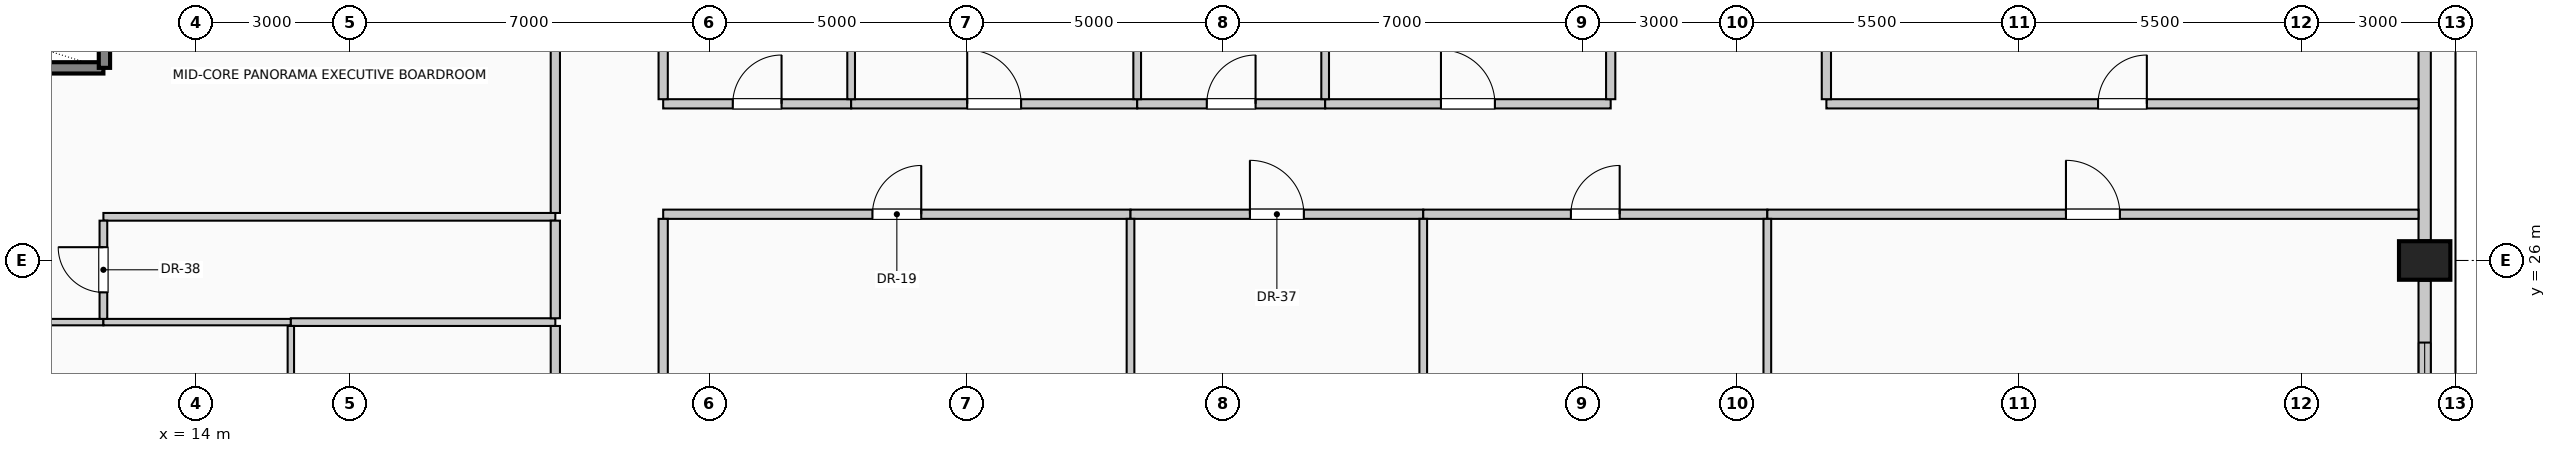
"""IFC4 building model, lengths in metres.
Left out: names, types, materials, properties, quantities, classifications, styles, units other than length and angle.
Written with IfcOpenShell. Run it as: python <this file> out.ifc"""

import sys

from ifc_helpers import new_model, si_unit, direction, frame, frame_2d, origin, origin_2d, place, context, subcontext, project, spatial, rectangle, extrude, element, fill, save


model = new_model("IFC4")
c1 = context("Model", 3, precision=1e-05, world=origin(), true_north=direction((0.0, 1.0)))
c2 = subcontext(c1, "Body", "Model", "MODEL_VIEW")
j1 = project(units=[si_unit("LENGTHUNIT", "METRE"), si_unit("PLANEANGLEUNIT", "RADIAN")], contexts=[c1])
p1 = place(None, origin())
s1 = spatial("IfcSite", under=j1, at=p1, CompositionType="ELEMENT")
p2 = place(p1, origin())
s2 = spatial("IfcBuilding", under=s1, at=p2, CompositionType="ELEMENT")
p3 = place(p2, frame((0.0, 0.0, 230.6)))
s3 = spatial("IfcBuildingStorey", under=s2, at=p3, CompositionType="ELEMENT", Elevation=230.6)
p4 = place(p3, frame((57.4, 26.0, 0.0), z_axis=(0.0, 0.0, 1.0), x_axis=(0.0, 1.0, 0.0)))
e1 = element("IfcColumn", 1, at=p4, inside=s3, PredefinedType="COLUMN", context=c2, shape_type="SweptSolid", body=[
    extrude(rectangle(XDim=0.75, YDim=1.0, at=origin_2d()), origin(), (0.0, 0.0, 1.0), 4.0),
])
p5 = place(p3, frame((57.4, 25.605, 0.0), z_axis=(0.0, 0.0, 1.0), x_axis=(0.0, -1.0, 0.0)))
e2 = element("IfcWall", 2, at=p5, inside=s3, PredefinedType="SOLIDWALL", context=c2, shape_type="SweptSolid", body=[
    extrude(rectangle(XDim=7.21, YDim=0.24, at=frame_2d((3.605, 0.0))), origin(), (0.0, 0.0, 1.0), 3.0),
])
p6 = place(p5, frame((1.203, 0.0, 0.42)))
e3 = element("IfcOpeningElement", 3, at=p6, cuts=e2, PredefinedType="OPENING", context=c2, shape_type="SweptSolid", body=[
    extrude(rectangle(XDim=1.8, YDim=2.2, at=frame_2d((0.9, 1.1))), frame((0.0, 0.13, 0.0), z_axis=(0.0, -1.0, 0.0), x_axis=(1.0, 0.0, 0.0)), (0.0, 0.0, 1.0), 0.26),
])
p7 = place(p5, frame((4.207, 0.0, 0.42)))
e4 = element("IfcOpeningElement", 4, at=p7, cuts=e2, PredefinedType="OPENING", context=c2, shape_type="SweptSolid", body=[
    extrude(rectangle(XDim=1.8, YDim=2.2, at=frame_2d((0.9, 1.1))), frame((0.0, 0.13, 0.0), z_axis=(0.0, -1.0, 0.0), x_axis=(1.0, 0.0, 0.0)), (0.0, 0.0, 1.0), 0.26),
])
p8 = place(p3, frame((57.4, 33.605, 0.0), z_axis=(0.0, 0.0, 1.0), x_axis=(0.0, -1.0, 0.0)))
e5 = element("IfcWall", 5, at=p8, inside=s3, PredefinedType="SOLIDWALL", context=c2, shape_type="SweptSolid", body=[
    extrude(rectangle(XDim=7.21, YDim=0.24, at=frame_2d((3.605, 0.0))), origin(), (0.0, 0.0, 1.0), 3.0),
])
p9 = place(p3, frame((3.55, 29.75, 0.0), z_axis=(0.0, 0.0, 1.0), x_axis=(1.0, 0.0, 0.0)))
e6 = element("IfcWall", 6, at=p9, inside=s3, PredefinedType="SOLIDWALL", context=c2, shape_type="SweptSolid", body=[
    extrude(rectangle(XDim=8.65, YDim=0.22, at=frame_2d((4.325, 0.0))), origin(), (0.0, 0.0, 1.0), 4.0),
])
p10 = place(p3, frame((12.22, 29.75, 0.0), z_axis=(0.0, 0.0, 1.0), x_axis=(0.0, 1.0, 0.0)))
e7 = element("IfcWall", 7, at=p10, inside=s3, PredefinedType="SOLIDWALL", context=c2, shape_type="SweptSolid", body=[
    extrude(rectangle(XDim=2.6, YDim=0.22, at=frame_2d((1.3, 0.0))), origin(), (0.0, 0.0, 1.0), 4.0),
])
p11 = place(p3, frame((9.8, 24.8, 0.0), z_axis=(0.0, 0.0, 1.0), x_axis=(1.0, 0.0, 0.0)))
e8 = element("IfcWall", 8, at=p11, inside=s3, PredefinedType="PARTITIONING", context=c2, shape_type="SweptSolid", body=[
    extrude(rectangle(XDim=2.4, YDim=0.125, at=frame_2d((1.2, 0.0))), origin(), (0.0, 0.0, 1.0), 3.75),
])
p12 = place(p3, frame((12.2, 24.8, 0.0), z_axis=(0.0, 0.0, 1.0), x_axis=(1.0, 0.0, 0.0)))
e9 = element("IfcWall", 9, at=p12, inside=s3, PredefinedType="PARTITIONING", context=c2, shape_type="SweptSolid", body=[
    extrude(rectangle(XDim=3.65, YDim=0.125, at=frame_2d((1.825, 0.0))), origin(), (0.0, 0.0, 1.0), 3.75),
])
p13 = place(p3, frame((15.85, 24.8, 0.0), z_axis=(0.0, 0.0, 1.0), x_axis=(1.0, 0.0, 0.0)))
e10 = element("IfcWall", 10, at=p13, inside=s3, PredefinedType="PARTITIONING", context=c2, shape_type="SweptSolid", body=[
    extrude(rectangle(XDim=5.15, YDim=0.15, at=frame_2d((2.575, 0.0))), origin(), (0.0, 0.0, 1.0), 3.75),
])
p14 = place(p3, frame((12.2, 26.85, 0.0), z_axis=(0.0, 0.0, 1.0), x_axis=(1.0, 0.0, 0.0)))
e11 = element("IfcWall", 11, at=p14, inside=s3, PredefinedType="PARTITIONING", context=c2, shape_type="SweptSolid", body=[
    extrude(rectangle(XDim=8.8, YDim=0.15, at=frame_2d((4.4, 0.0))), origin(), (0.0, 0.0, 1.0), 3.75),
])
p15 = place(p3, frame((23.1, 26.9, 0.0), z_axis=(0.0, 0.0, 1.0), x_axis=(1.0, 0.0, 0.0)))
e12 = element("IfcWall", 12, at=p15, inside=s3, PredefinedType="PARTITIONING", context=c2, shape_type="SweptSolid", body=[
    extrude(rectangle(XDim=9.1, YDim=0.18, at=frame_2d((4.55, 0.0))), origin(), (0.0, 0.0, 1.0), 3.75),
])
p16 = place(p15, frame((4.075, 0.0, 0.0)))
e13 = element("IfcOpeningElement", 13, at=p16, cuts=e12, PredefinedType="OPENING", context=c2, shape_type="SweptSolid", body=[
    extrude(rectangle(XDim=0.95, YDim=2.15, at=frame_2d((0.475, 1.075))), frame((0.0, 0.1, 0.0), z_axis=(0.0, -1.0, 0.0), x_axis=(1.0, 0.0, 0.0)), (0.0, 0.0, 1.0), 0.2),
])
p17 = place(p3, frame((32.2, 26.9, 0.0), z_axis=(0.0, 0.0, 1.0), x_axis=(1.0, 0.0, 0.0)))
e14 = element("IfcWall", 14, at=p17, inside=s3, PredefinedType="PARTITIONING", context=c2, shape_type="SweptSolid", body=[
    extrude(rectangle(XDim=5.7, YDim=0.18, at=frame_2d((2.85, 0.0))), origin(), (0.0, 0.0, 1.0), 3.75),
])
p18 = place(p17, frame((2.325, 0.0, 0.0)))
e15 = element("IfcOpeningElement", 15, at=p18, cuts=e14, PredefinedType="OPENING", context=c2, shape_type="SweptSolid", body=[
    extrude(rectangle(XDim=1.05, YDim=2.15, at=frame_2d((0.525, 1.075))), frame((0.0, 0.1, 0.0), z_axis=(0.0, -1.0, 0.0), x_axis=(1.0, 0.0, 0.0)), (0.0, 0.0, 1.0), 0.2),
])
p19 = place(p3, frame((37.9, 26.9, 0.0), z_axis=(0.0, 0.0, 1.0), x_axis=(1.0, 0.0, 0.0)))
e16 = element("IfcWall", 16, at=p19, inside=s3, PredefinedType="PARTITIONING", context=c2, shape_type="SweptSolid", body=[
    extrude(rectangle(XDim=6.7, YDim=0.18, at=frame_2d((3.35, 0.0))), origin(), (0.0, 0.0, 1.0), 3.75),
])
p20 = place(p19, frame((2.875, 0.0, 0.0)))
e17 = element("IfcOpeningElement", 17, at=p20, cuts=e16, PredefinedType="OPENING", context=c2, shape_type="SweptSolid", body=[
    extrude(rectangle(XDim=0.95, YDim=2.15, at=frame_2d((0.475, 1.075))), frame((0.0, 0.1, 0.0), z_axis=(0.0, -1.0, 0.0), x_axis=(1.0, 0.0, 0.0)), (0.0, 0.0, 1.0), 0.2),
])
p21 = place(p3, frame((44.6, 26.9, 0.0), z_axis=(0.0, 0.0, 1.0), x_axis=(1.0, 0.0, 0.0)))
e18 = element("IfcWall", 18, at=p21, inside=s3, PredefinedType="PARTITIONING", context=c2, shape_type="SweptSolid", body=[
    extrude(rectangle(XDim=12.68, YDim=0.18, at=frame_2d((6.34, 0.0))), origin(), (0.0, 0.0, 1.0), 3.75),
])
p22 = place(p21, frame((5.815, 0.0, 0.0)))
e19 = element("IfcOpeningElement", 19, at=p22, cuts=e18, PredefinedType="OPENING", context=c2, shape_type="SweptSolid", body=[
    extrude(rectangle(XDim=1.05, YDim=2.15, at=frame_2d((0.525, 1.075))), frame((0.0, 0.1, 0.0), z_axis=(0.0, -1.0, 0.0), x_axis=(1.0, 0.0, 0.0)), (0.0, 0.0, 1.0), 0.2),
])
p23 = place(p3, frame((23.1, 29.05, 0.0), z_axis=(0.0, 0.0, 1.0), x_axis=(1.0, 0.0, 0.0)))
e20 = element("IfcWall", 20, at=p23, inside=s3, PredefinedType="PARTITIONING", context=c2, shape_type="SweptSolid", body=[
    extrude(rectangle(XDim=3.66, YDim=0.18, at=frame_2d((1.83, 0.0))), origin(), (0.0, 0.0, 1.0), 3.75),
])
p24 = place(p23, frame((1.355, 0.0, 0.0)))
e21 = element("IfcOpeningElement", 21, at=p24, cuts=e20, PredefinedType="OPENING", context=c2, shape_type="SweptSolid", body=[
    extrude(rectangle(XDim=0.95, YDim=2.15, at=frame_2d((0.475, 1.075))), frame((0.0, 0.1, 0.0), z_axis=(0.0, -1.0, 0.0), x_axis=(1.0, 0.0, 0.0)), (0.0, 0.0, 1.0), 0.2),
])
p25 = place(p3, frame((26.76, 29.05, 0.0), z_axis=(0.0, 0.0, 1.0), x_axis=(1.0, 0.0, 0.0)))
e22 = element("IfcWall", 22, at=p25, inside=s3, PredefinedType="PARTITIONING", context=c2, shape_type="SweptSolid", body=[
    extrude(rectangle(XDim=5.57, YDim=0.18, at=frame_2d((2.785, 0.0))), origin(), (0.0, 0.0, 1.0), 3.75),
])
p26 = place(p25, frame((2.26, 0.0, 0.0)))
e23 = element("IfcOpeningElement", 23, at=p26, cuts=e22, PredefinedType="OPENING", context=c2, shape_type="SweptSolid", body=[
    extrude(rectangle(XDim=1.05, YDim=2.15, at=frame_2d((0.525, 1.075))), frame((0.0, 0.1, 0.0), z_axis=(0.0, -1.0, 0.0), x_axis=(1.0, 0.0, 0.0)), (0.0, 0.0, 1.0), 0.2),
])
p27 = place(p3, frame((32.33, 29.05, 0.0), z_axis=(0.0, 0.0, 1.0), x_axis=(1.0, 0.0, 0.0)))
e24 = element("IfcWall", 24, at=p27, inside=s3, PredefinedType="PARTITIONING", context=c2, shape_type="SweptSolid", body=[
    extrude(rectangle(XDim=3.66, YDim=0.18, at=frame_2d((1.83, 0.0))), origin(), (0.0, 0.0, 1.0), 3.75),
])
p28 = place(p27, frame((1.355, 0.0, 0.0)))
e25 = element("IfcOpeningElement", 25, at=p28, cuts=e24, PredefinedType="OPENING", context=c2, shape_type="SweptSolid", body=[
    extrude(rectangle(XDim=0.95, YDim=2.15, at=frame_2d((0.475, 1.075))), frame((0.0, 0.1, 0.0), z_axis=(0.0, -1.0, 0.0), x_axis=(1.0, 0.0, 0.0)), (0.0, 0.0, 1.0), 0.2),
])
p29 = place(p3, frame((35.99, 29.05, 0.0), z_axis=(0.0, 0.0, 1.0), x_axis=(1.0, 0.0, 0.0)))
e26 = element("IfcWall", 26, at=p29, inside=s3, PredefinedType="PARTITIONING", context=c2, shape_type="SweptSolid", body=[
    extrude(rectangle(XDim=5.56, YDim=0.18, at=frame_2d((2.78, 0.0))), origin(), (0.0, 0.0, 1.0), 3.75),
])
p30 = place(p29, frame((2.255, 0.0, 0.0)))
e27 = element("IfcOpeningElement", 27, at=p30, cuts=e26, PredefinedType="OPENING", context=c2, shape_type="SweptSolid", body=[
    extrude(rectangle(XDim=1.05, YDim=2.15, at=frame_2d((0.525, 1.075))), frame((0.0, 0.1, 0.0), z_axis=(0.0, -1.0, 0.0), x_axis=(1.0, 0.0, 0.0)), (0.0, 0.0, 1.0), 0.2),
])
p31 = place(p3, frame((45.75, 29.05, 0.0), z_axis=(0.0, 0.0, 1.0), x_axis=(1.0, 0.0, 0.0)))
e28 = element("IfcWall", 28, at=p31, inside=s3, PredefinedType="PARTITIONING", context=c2, shape_type="SweptSolid", body=[
    extrude(rectangle(XDim=11.53, YDim=0.18, at=frame_2d((5.765, 0.0))), origin(), (0.0, 0.0, 1.0), 3.75),
])
p32 = place(p31, frame((5.29, 0.0, 0.0)))
e29 = element("IfcOpeningElement", 29, at=p32, cuts=e28, PredefinedType="OPENING", context=c2, shape_type="SweptSolid", body=[
    extrude(rectangle(XDim=0.95, YDim=2.15, at=frame_2d((0.475, 1.075))), frame((0.0, 0.1, 0.0), z_axis=(0.0, -1.0, 0.0), x_axis=(1.0, 0.0, 0.0)), (0.0, 0.0, 1.0), 0.2),
])
p33 = place(p3, frame((12.2, 24.863, 0.0), z_axis=(0.0, 0.0, 1.0), x_axis=(0.0, 1.0, 0.0)))
e30 = element("IfcWall", 30, at=p33, inside=s3, PredefinedType="PARTITIONING", context=c2, shape_type="SweptSolid", body=[
    extrude(rectangle(XDim=1.912, YDim=0.15, at=frame_2d((0.956, 0.0))), origin(), (0.0, 0.0, 1.0), 3.75),
])
p34 = place(p33, frame((0.516, 0.0, 0.0)))
e31 = element("IfcOpeningElement", 31, at=p34, cuts=e30, PredefinedType="OPENING", context=c2, shape_type="SweptSolid", body=[
    extrude(rectangle(XDim=0.88, YDim=2.1, at=frame_2d((0.44, 1.05))), frame((0.0, 0.085, 0.0), z_axis=(0.0, -1.0, 0.0), x_axis=(1.0, 0.0, 0.0)), (0.0, 0.0, 1.0), 0.17),
])
p35 = place(p3, frame((15.85, 17.39, 0.0), z_axis=(0.0, 0.0, 1.0), x_axis=(0.0, 1.0, 0.0)))
e32 = element("IfcWall", 32, at=p35, inside=s3, PredefinedType="PARTITIONING", context=c2, shape_type="SweptSolid", body=[
    extrude(rectangle(XDim=7.335, YDim=0.125, at=frame_2d((3.667, 0.0))), origin(), (0.0, 0.0, 1.0), 3.75),
])
p36 = place(p3, frame((21.0, 17.39, 0.0), z_axis=(0.0, 0.0, 1.0), x_axis=(0.0, 1.0, 0.0)))
e33 = element("IfcWall", 33, at=p36, inside=s3, PredefinedType="PARTITIONING", context=c2, shape_type="SweptSolid", body=[
    extrude(rectangle(XDim=7.335, YDim=0.18, at=frame_2d((3.667, 0.0))), origin(), (0.0, 0.0, 1.0), 3.75),
])
p37 = place(p3, frame((21.0, 24.875, 0.0), z_axis=(0.0, 0.0, 1.0), x_axis=(0.0, 1.0, 0.0)))
e34 = element("IfcWall", 34, at=p37, inside=s3, PredefinedType="PARTITIONING", context=c2, shape_type="SweptSolid", body=[
    extrude(rectangle(XDim=1.9, YDim=0.18, at=frame_2d((0.95, 0.0))), origin(), (0.0, 0.0, 1.0), 3.75),
])
p38 = place(p3, frame((21.0, 26.925, 0.0), z_axis=(0.0, 0.0, 1.0), x_axis=(0.0, 1.0, 0.0)))
e35 = element("IfcWall", 35, at=p38, inside=s3, PredefinedType="PARTITIONING", context=c2, shape_type="SweptSolid", body=[
    extrude(rectangle(XDim=5.335, YDim=0.18, at=frame_2d((2.667, 0.0))), origin(), (0.0, 0.0, 1.0), 3.75),
])
p39 = place(p3, frame((23.1, 17.3, 0.0), z_axis=(0.0, 0.0, 1.0), x_axis=(0.0, 1.0, 0.0)))
e36 = element("IfcWall", 36, at=p39, inside=s3, PredefinedType="PARTITIONING", context=c2, shape_type="SweptSolid", body=[
    extrude(rectangle(XDim=9.51, YDim=0.18, at=frame_2d((4.755, 0.0))), origin(), (0.0, 0.0, 1.0), 3.75),
])
p40 = place(p3, frame((23.1, 29.14, 0.0), z_axis=(0.0, 0.0, 1.0), x_axis=(0.0, 1.0, 0.0)))
e37 = element("IfcWall", 37, at=p40, inside=s3, PredefinedType="PARTITIONING", context=c2, shape_type="SweptSolid", body=[
    extrude(rectangle(XDim=3.12, YDim=0.18, at=frame_2d((1.56, 0.0))), origin(), (0.0, 0.0, 1.0), 3.75),
])
p41 = place(p3, frame((26.76, 29.14, 0.0), z_axis=(0.0, 0.0, 1.0), x_axis=(0.0, 1.0, 0.0)))
e38 = element("IfcWall", 38, at=p41, inside=s3, PredefinedType="PARTITIONING", context=c2, shape_type="SweptSolid", body=[
    extrude(rectangle(XDim=16.14, YDim=0.15, at=frame_2d((8.07, 0.0))), origin(), (0.0, 0.0, 1.0), 3.75),
])
p42 = place(p3, frame((32.2, 0.72, 0.0), z_axis=(0.0, 0.0, 1.0), x_axis=(0.0, 1.0, 0.0)))
e39 = element("IfcWall", 39, at=p42, inside=s3, PredefinedType="PARTITIONING", context=c2, shape_type="SweptSolid", body=[
    extrude(rectangle(XDim=26.09, YDim=0.15, at=frame_2d((13.045, 0.0))), origin(), (0.0, 0.0, 1.0), 3.75),
])
for number, where, z_axis, x_axis in (
    (40, (32.33, 29.14, 0.0), (0.0, 0.0, 1.0), (0.0, 1.0, 0.0)),
    (41, (35.99, 29.14, 0.0), (0.0, 0.0, 1.0), (0.0, 1.0, 0.0)),
):
    element("IfcWall", number, at=place(p3, frame(where, z_axis=z_axis, x_axis=x_axis)), inside=s3, PredefinedType="PARTITIONING", context=c2, shape_type="SweptSolid", body=[
        extrude(rectangle(XDim=16.14, YDim=0.15, at=frame_2d((8.07, 0.0))), origin(), (0.0, 0.0, 1.0), 3.75),
    ])
p43 = place(p3, frame((37.9, 0.72, 0.0), z_axis=(0.0, 0.0, 1.0), x_axis=(0.0, 1.0, 0.0)))
e42 = element("IfcWall", 42, at=p43, inside=s3, PredefinedType="PARTITIONING", context=c2, shape_type="SweptSolid", body=[
    extrude(rectangle(XDim=26.09, YDim=0.15, at=frame_2d((13.045, 0.0))), origin(), (0.0, 0.0, 1.0), 3.75),
])
p44 = place(p3, frame((41.55, 29.14, 0.0), z_axis=(0.0, 0.0, 1.0), x_axis=(0.0, 1.0, 0.0)))
e43 = element("IfcWall", 43, at=p44, inside=s3, PredefinedType="PARTITIONING", context=c2, shape_type="SweptSolid", body=[
    extrude(rectangle(XDim=3.21, YDim=0.18, at=frame_2d((1.605, 0.0))), origin(), (0.0, 0.0, 1.0), 3.145),
])
p45 = place(p3, frame((44.6, 0.72, 0.0), z_axis=(0.0, 0.0, 1.0), x_axis=(0.0, 1.0, 0.0)))
e44 = element("IfcWall", 44, at=p45, inside=s3, PredefinedType="PARTITIONING", context=c2, shape_type="SweptSolid", body=[
    extrude(rectangle(XDim=26.09, YDim=0.15, at=frame_2d((13.045, 0.0))), origin(), (0.0, 0.0, 1.0), 3.75),
])
p46 = place(p3, frame((45.75, 29.14, 0.0), z_axis=(0.0, 0.0, 1.0), x_axis=(0.0, 1.0, 0.0)))
e45 = element("IfcWall", 45, at=p46, inside=s3, PredefinedType="PARTITIONING", context=c2, shape_type="SweptSolid", body=[
    extrude(rectangle(XDim=3.135, YDim=0.18, at=frame_2d((1.567, 0.0))), origin(), (0.0, 0.0, 1.0), 3.75),
])
p47 = place(p6, origin())
e46 = element("IfcWindow", 46, at=p47, inside=s3, PartitioningType="SINGLE_PANEL", PredefinedType="WINDOW", context=c2, shape_type="SweptSolid", body=[
    extrude(rectangle(XDim=1.8, YDim=2.2, at=frame_2d((0.9, 1.1))), frame((0.0, 0.03, 0.0), z_axis=(0.0, -1.0, 0.0), x_axis=(1.0, 0.0, 0.0)), (0.0, 0.0, 1.0), 0.06),
])
fill(e3, e46)
p48 = place(p16, origin())
e47 = element("IfcDoor", 47, at=p48, inside=s3, OperationType="SINGLE_SWING_RIGHT", PredefinedType="DOOR", context=c2, shape_type="SweptSolid", body=[
    extrude(rectangle(XDim=0.95, YDim=2.15, at=frame_2d((0.475, 1.075))), frame((0.0, 0.025, 0.0), z_axis=(0.0, -1.0, 0.0), x_axis=(1.0, 0.0, 0.0)), (0.0, 0.0, 1.0), 0.05),
])
fill(e13, e47)
p49 = place(p18, origin())
e48 = element("IfcDoor", 48, at=p49, inside=s3, OperationType="SINGLE_SWING_LEFT", PredefinedType="DOOR", context=c2, shape_type="SweptSolid", body=[
    extrude(rectangle(XDim=1.05, YDim=2.15, at=frame_2d((0.525, 1.075))), frame((0.0, 0.025, 0.0), z_axis=(0.0, -1.0, 0.0), x_axis=(1.0, 0.0, 0.0)), (0.0, 0.0, 1.0), 0.05),
])
fill(e15, e48)
p50 = place(p20, origin())
e49 = element("IfcDoor", 49, at=p50, inside=s3, OperationType="SINGLE_SWING_RIGHT", PredefinedType="DOOR", context=c2, shape_type="SweptSolid", body=[
    extrude(rectangle(XDim=0.95, YDim=2.15, at=frame_2d((0.475, 1.075))), frame((0.0, 0.025, 0.0), z_axis=(0.0, -1.0, 0.0), x_axis=(1.0, 0.0, 0.0)), (0.0, 0.0, 1.0), 0.05),
])
fill(e17, e49)
p51 = place(p22, origin())
e50 = element("IfcDoor", 50, at=p51, inside=s3, OperationType="SINGLE_SWING_LEFT", PredefinedType="DOOR", context=c2, shape_type="SweptSolid", body=[
    extrude(rectangle(XDim=1.05, YDim=2.15, at=frame_2d((0.525, 1.075))), frame((0.0, 0.025, 0.0), z_axis=(0.0, -1.0, 0.0), x_axis=(1.0, 0.0, 0.0)), (0.0, 0.0, 1.0), 0.05),
])
fill(e19, e50)
p52 = place(p24, origin())
e51 = element("IfcDoor", 51, at=p52, inside=s3, OperationType="SINGLE_SWING_RIGHT", PredefinedType="DOOR", context=c2, shape_type="SweptSolid", body=[
    extrude(rectangle(XDim=0.95, YDim=2.15, at=frame_2d((0.475, 1.075))), frame((0.0, 0.025, 0.0), z_axis=(0.0, -1.0, 0.0), x_axis=(1.0, 0.0, 0.0)), (0.0, 0.0, 1.0), 0.05),
])
fill(e21, e51)
p53 = place(p26, origin())
e52 = element("IfcDoor", 52, at=p53, inside=s3, OperationType="SINGLE_SWING_LEFT", PredefinedType="DOOR", context=c2, shape_type="SweptSolid", body=[
    extrude(rectangle(XDim=1.05, YDim=2.15, at=frame_2d((0.525, 1.075))), frame((0.0, 0.025, 0.0), z_axis=(0.0, -1.0, 0.0), x_axis=(1.0, 0.0, 0.0)), (0.0, 0.0, 1.0), 0.05),
])
fill(e23, e52)
p54 = place(p28, origin())
e53 = element("IfcDoor", 53, at=p54, inside=s3, OperationType="SINGLE_SWING_RIGHT", PredefinedType="DOOR", context=c2, shape_type="SweptSolid", body=[
    extrude(rectangle(XDim=0.95, YDim=2.15, at=frame_2d((0.475, 1.075))), frame((0.0, 0.025, 0.0), z_axis=(0.0, -1.0, 0.0), x_axis=(1.0, 0.0, 0.0)), (0.0, 0.0, 1.0), 0.05),
])
fill(e25, e53)
p55 = place(p30, origin())
e54 = element("IfcDoor", 54, at=p55, inside=s3, OperationType="SINGLE_SWING_LEFT", PredefinedType="DOOR", context=c2, shape_type="SweptSolid", body=[
    extrude(rectangle(XDim=1.05, YDim=2.15, at=frame_2d((0.525, 1.075))), frame((0.0, 0.025, 0.0), z_axis=(0.0, -1.0, 0.0), x_axis=(1.0, 0.0, 0.0)), (0.0, 0.0, 1.0), 0.05),
])
fill(e27, e54)
p56 = place(p32, origin())
e55 = element("IfcDoor", 55, at=p56, inside=s3, OperationType="SINGLE_SWING_RIGHT", PredefinedType="DOOR", context=c2, shape_type="SweptSolid", body=[
    extrude(rectangle(XDim=0.95, YDim=2.15, at=frame_2d((0.475, 1.075))), frame((0.0, 0.025, 0.0), z_axis=(0.0, -1.0, 0.0), x_axis=(1.0, 0.0, 0.0)), (0.0, 0.0, 1.0), 0.05),
])
fill(e29, e55)
p57 = place(p34, origin())
e56 = element("IfcDoor", 56, at=p57, inside=s3, OperationType="SINGLE_SWING_RIGHT", PredefinedType="DOOR", context=c2, shape_type="SweptSolid", body=[
    extrude(rectangle(XDim=0.88, YDim=2.1, at=frame_2d((0.44, 1.05))), frame((0.0, 0.025, 0.0), z_axis=(0.0, -1.0, 0.0), x_axis=(1.0, 0.0, 0.0)), (0.0, 0.0, 1.0), 0.05),
])
fill(e31, e56)
save(model, sys.argv[1])
